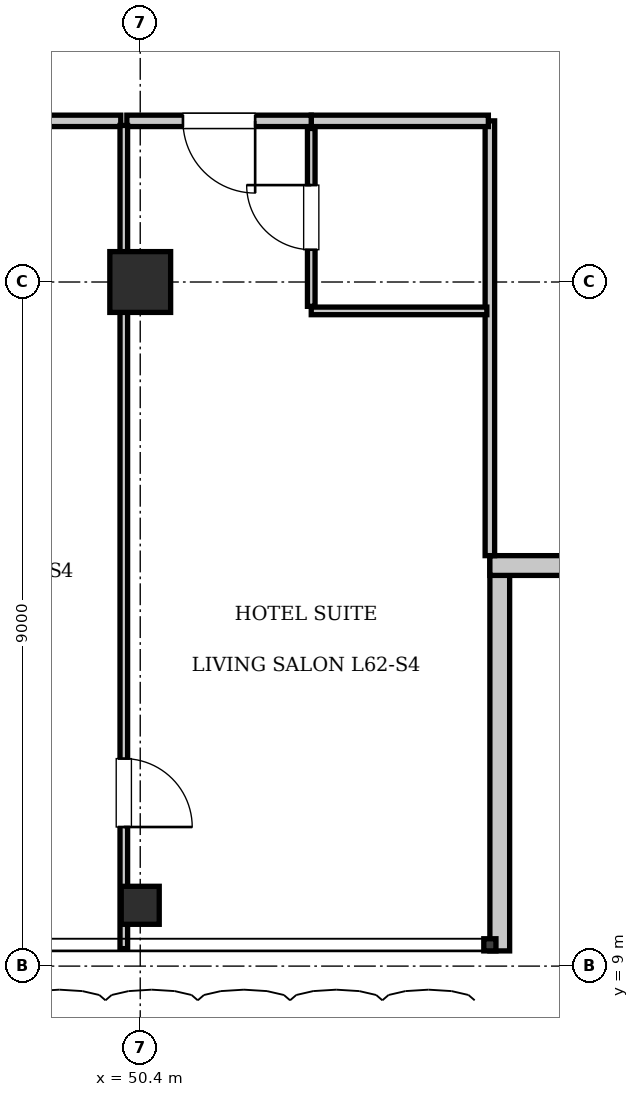
"""IFC4 building model, lengths in metres.
Left out: names, types, materials, properties, quantities, classifications, styles, units other than length and angle.
Written with IfcOpenShell. Run it as: python <this file> out.ifc"""

import sys

from ifc_helpers import new_model, si_unit, direction, frame, frame_2d, origin, origin_2d, place, context, subcontext, project, spatial, rectangle, i_section, extrude, element, fill, save


model = new_model("IFC4")
c1 = context("Model", 3, precision=1e-05, world=origin(), true_north=direction((0.0, 1.0)))
c2 = subcontext(c1, "Body", "Model", "MODEL_VIEW")
j1 = project(units=[si_unit("LENGTHUNIT", "METRE"), si_unit("PLANEANGLEUNIT", "RADIAN")], contexts=[c1])
p1 = place(None, origin())
s1 = spatial("IfcSite", under=j1, at=p1, CompositionType="ELEMENT")
p2 = place(p1, origin())
s2 = spatial("IfcBuilding", under=s1, at=p2, CompositionType="ELEMENT")
p3 = place(p2, frame((0.0, 0.0, 254.8)))
s3 = spatial("IfcBuildingStorey", under=s2, at=p3, CompositionType="ELEMENT", Elevation=254.8)
p4 = place(p3, frame((50.4, 18.0, 0.0), z_axis=(0.0, 0.0, 1.0), x_axis=(1.0, 0.0, 0.0)))
e1 = element("IfcColumn", 1, at=p4, inside=s3, PredefinedType="COLUMN", context=c2, shape_type="SweptSolid", body=[
    extrude(rectangle(XDim=0.8, YDim=0.8, at=origin_2d()), origin(), (0.0, 0.0, 1.0), 3.85),
])
p5 = place(p3, frame((50.4, 9.8, 0.0), z_axis=(0.0, 0.0, 1.0), x_axis=(1.0, 0.0, 0.0)))
e2 = element("IfcColumn", 2, at=p5, inside=s3, PredefinedType="COLUMN", context=c2, shape_type="SweptSolid", body=[
    extrude(i_section(OverallWidth=0.5, OverallDepth=0.5, WebThickness=0.022, FlangeThickness=0.032, at=origin_2d()), origin(), (0.0, 0.0, 1.0), 3.85),
])
p6 = place(p3, frame((55.13, 14.4, 0.0), z_axis=(0.0, 0.0, 1.0), x_axis=(0.0, -1.0, 0.0)))
e3 = element("IfcWall", 3, at=p6, inside=s3, PredefinedType="SOLIDWALL", context=c2, shape_type="SweptSolid", body=[
    extrude(rectangle(XDim=5.2, YDim=0.26, at=frame_2d((2.6, 0.0))), origin(), (0.0, 0.0, 1.0), 3.61),
])
p7 = place(p3, frame((60.2, 14.27, 0.0), z_axis=(0.0, 0.0, 1.0), x_axis=(-1.0, 0.0, 0.0)))
e4 = element("IfcWall", 4, at=p7, inside=s3, PredefinedType="SOLIDWALL", context=c2, shape_type="SweptSolid", body=[
    extrude(rectangle(XDim=5.2, YDim=0.26, at=frame_2d((2.6, 0.0))), origin(), (0.0, 0.0, 1.0), 3.61),
])
p8 = place(p7, frame((1.6, 0.0, 0.9)))
e5 = element("IfcOpeningElement", 5, at=p8, cuts=e4, PredefinedType="OPENING", context=c2, shape_type="SweptSolid", body=[
    extrude(rectangle(XDim=2.0, YDim=2.2, at=frame_2d((1.0, 1.1))), frame((0.0, 0.14, 0.0), z_axis=(0.0, -1.0, 0.0), x_axis=(1.0, 0.0, 0.0)), (0.0, 0.0, 1.0), 0.28),
])
p9 = place(p3, frame((55.0, 14.4, 0.0), z_axis=(0.0, 0.0, 1.0), x_axis=(0.0, 1.0, 0.0)))
e6 = element("IfcWall", 6, at=p9, inside=s3, PredefinedType="PARTITIONING", context=c2, shape_type="SweptSolid", body=[
    extrude(rectangle(XDim=5.72, YDim=0.125, at=frame_2d((2.86, 0.0))), origin(), (0.0, 0.0, 1.0), 3.61),
])
p10 = place(p3, frame((52.65, 20.12, 0.0), z_axis=(0.0, 0.0, 1.0), x_axis=(1.0, 0.0, 0.0)))
e7 = element("IfcWall", 7, at=p10, inside=s3, PredefinedType="PARTITIONING", context=c2, shape_type="SweptSolid", body=[
    extrude(rectangle(XDim=2.33, YDim=0.15, at=frame_2d((1.165, 0.0))), origin(), (0.0, 0.0, 1.0), 3.61),
])
p11 = place(p3, frame((52.65, 17.62, 0.0), z_axis=(0.0, 0.0, 1.0), x_axis=(1.0, 0.0, 0.0)))
e8 = element("IfcWall", 8, at=p11, inside=s3, PredefinedType="PARTITIONING", context=c2, shape_type="SweptSolid", body=[
    extrude(rectangle(XDim=2.31, YDim=0.1, at=frame_2d((1.155, 0.0))), origin(), (0.0, 0.0, 1.0), 3.61),
])
p12 = place(p3, frame((52.65, 17.68, 0.0), z_axis=(0.0, 0.0, 1.0), x_axis=(0.0, 1.0, 0.0)))
e9 = element("IfcWall", 9, at=p12, inside=s3, PredefinedType="PARTITIONING", context=c2, shape_type="SweptSolid", body=[
    extrude(rectangle(XDim=2.34, YDim=0.1, at=frame_2d((1.17, 0.0))), origin(), (0.0, 0.0, 1.0), 3.61),
])
p13 = place(p12, frame((0.745, 0.0, 0.0)))
e10 = element("IfcOpeningElement", 10, at=p13, cuts=e9, PredefinedType="OPENING", context=c2, shape_type="SweptSolid", body=[
    extrude(rectangle(XDim=0.85, YDim=2.1, at=frame_2d((0.425, 1.05))), frame((0.0, 0.06, 0.0), z_axis=(0.0, -1.0, 0.0), x_axis=(1.0, 0.0, 0.0)), (0.0, 0.0, 1.0), 0.12),
])
p14 = place(p3, frame((46.42, 20.12, 0.0), z_axis=(0.0, 0.0, 1.0), x_axis=(1.0, 0.0, 0.0)))
e11 = element("IfcWall", 11, at=p14, inside=s3, PredefinedType="PARTITIONING", context=c2, shape_type="SweptSolid", body=[
    extrude(rectangle(XDim=3.724, YDim=0.15, at=frame_2d((1.862, 0.0))), origin(), (0.0, 0.0, 1.0), 3.61),
])
p15 = place(p3, frame((50.224, 20.12, 0.0), z_axis=(0.0, 0.0, 1.0), x_axis=(1.0, 0.0, 0.0)))
e12 = element("IfcWall", 12, at=p15, inside=s3, PredefinedType="PARTITIONING", context=c2, shape_type="SweptSolid", body=[
    extrude(rectangle(XDim=2.426, YDim=0.15, at=frame_2d((1.213, 0.0))), origin(), (0.0, 0.0, 1.0), 3.61),
])
p16 = place(p15, frame((0.738, 0.0, 0.0)))
e13 = element("IfcOpeningElement", 13, at=p16, cuts=e12, PredefinedType="OPENING", context=c2, shape_type="SweptSolid", body=[
    extrude(rectangle(XDim=0.95, YDim=2.15, at=frame_2d((0.475, 1.075))), frame((0.0, 0.085, 0.0), z_axis=(0.0, -1.0, 0.0), x_axis=(1.0, 0.0, 0.0)), (0.0, 0.0, 1.0), 0.17),
])
p17 = place(p3, frame((50.184, 9.23, 0.0), z_axis=(0.0, 0.0, 1.0), x_axis=(0.0, 1.0, 0.0)))
e14 = element("IfcWall", 14, at=p17, inside=s3, PredefinedType="PARTITIONING", context=c2, shape_type="SweptSolid", body=[
    extrude(rectangle(XDim=10.83, YDim=0.1, at=frame_2d((5.415, 0.0))), origin(), (0.0, 0.0, 1.0), 3.61),
])
p18 = place(p17, frame((1.6, 0.0, 0.0)))
e15 = element("IfcOpeningElement", 15, at=p18, cuts=e14, PredefinedType="OPENING", context=c2, shape_type="SweptSolid", body=[
    extrude(rectangle(XDim=0.9, YDim=2.1, at=frame_2d((0.45, 1.05))), frame((0.0, 0.06, 0.0), z_axis=(0.0, -1.0, 0.0), x_axis=(1.0, 0.0, 0.0)), (0.0, 0.0, 1.0), 0.12),
])
p19 = place(p13, origin())
e16 = element("IfcDoor", 16, at=p19, inside=s3, OperationType="SINGLE_SWING_RIGHT", PredefinedType="DOOR", context=c2, shape_type="SweptSolid", body=[
    extrude(rectangle(XDim=0.85, YDim=2.1, at=frame_2d((0.425, 1.05))), frame((0.0, 0.025, 0.0), z_axis=(0.0, -1.0, 0.0), x_axis=(1.0, 0.0, 0.0)), (0.0, 0.0, 1.0), 0.05),
])
fill(e10, e16)
p20 = place(p16, frame((0.95, 0.0, 0.0), z_axis=(0.0, 0.0, 1.0), x_axis=(-1.0, 0.0, 0.0)))
e17 = element("IfcDoor", 17, at=p20, inside=s3, OperationType="SINGLE_SWING_LEFT", PredefinedType="DOOR", context=c2, shape_type="SweptSolid", body=[
    extrude(rectangle(XDim=0.95, YDim=2.15, at=frame_2d((0.475, 1.075))), frame((0.0, 0.025, 0.0), z_axis=(0.0, -1.0, 0.0), x_axis=(1.0, 0.0, 0.0)), (0.0, 0.0, 1.0), 0.05),
])
fill(e13, e17)
p21 = place(p18, frame((0.9, 0.0, 0.0), z_axis=(0.0, 0.0, 1.0), x_axis=(-1.0, 0.0, 0.0)))
e18 = element("IfcDoor", 18, at=p21, inside=s3, OperationType="SINGLE_SWING_RIGHT", PredefinedType="DOOR", context=c2, shape_type="SweptSolid", body=[
    extrude(rectangle(XDim=0.9, YDim=2.1, at=frame_2d((0.45, 1.05))), frame((0.0, 0.025, 0.0), z_axis=(0.0, -1.0, 0.0), x_axis=(1.0, 0.0, 0.0)), (0.0, 0.0, 1.0), 0.05),
])
fill(e15, e18)
save(model, sys.argv[1])
